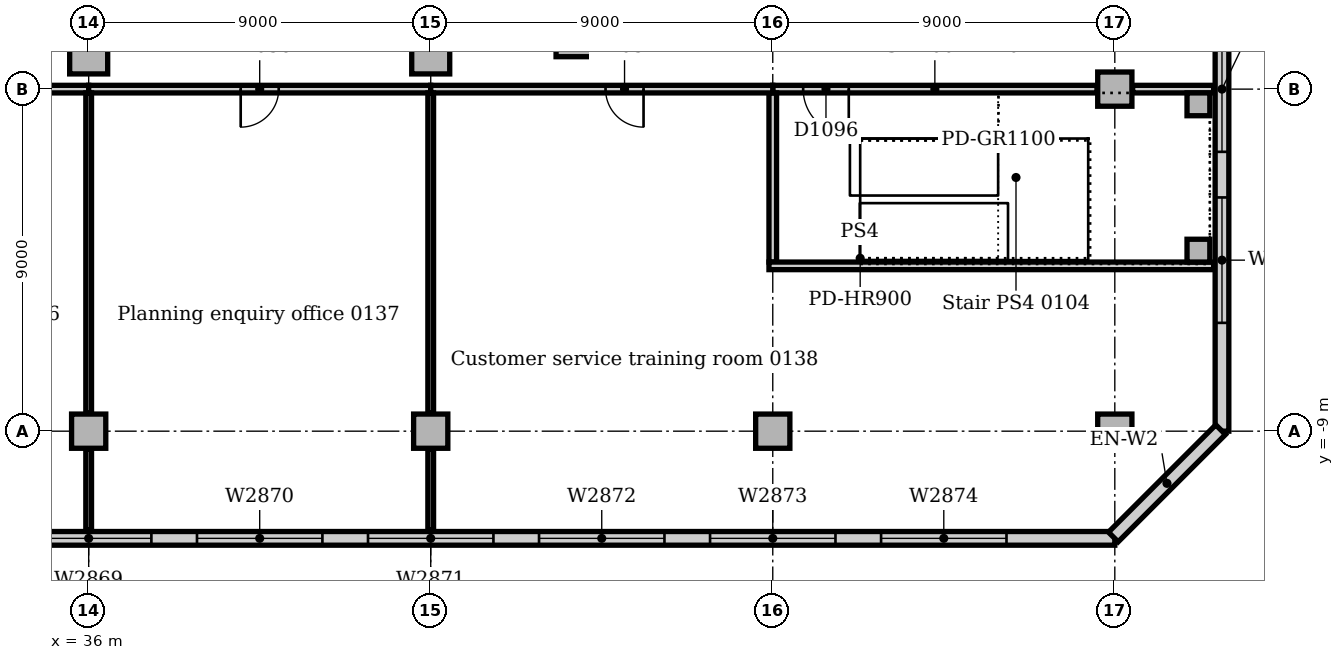
"""IFC4 building model, lengths in metres.
Left out: names, types, materials, properties, quantities, classifications, styles, units other than length and angle.
Written with IfcOpenShell. Run it as: python <this file> out.ifc"""

import sys

from ifc_helpers import new_model, si_unit, direction, frame, frame_2d, origin, origin_2d, place, context, subcontext, project, spatial, rectangle, extrude, element, fill, save


model = new_model("IFC4")
c1 = context("Model", 3, precision=1e-05, world=origin(), true_north=direction((0.0, 1.0)))
c2 = subcontext(c1, "Body", "Model", "MODEL_VIEW")
j1 = project(units=[si_unit("LENGTHUNIT", "METRE"), si_unit("PLANEANGLEUNIT", "RADIAN")], contexts=[c1])
p1 = place(None, origin())
s1 = spatial("IfcSite", under=j1, at=p1, CompositionType="ELEMENT")
p2 = place(p1, origin())
s2 = spatial("IfcBuilding", under=s1, at=p2, CompositionType="ELEMENT")
p3 = place(p2, frame((0.0, 0.0, 6.0)))
s3 = spatial("IfcBuildingStorey", under=s2, at=p3, CompositionType="ELEMENT", Elevation=6.0)
p4 = place(p3, frame((48.898, 1.453, 0.0), z_axis=(0.0, 0.0, 1.0), x_axis=(1.0, 0.0, 0.0)))
e1 = element("IfcColumn", 1, at=p4, inside=s3, PredefinedType="COLUMN", context=c2, shape_type="SweptSolid", body=[
    extrude(rectangle(XDim=1.2, YDim=1.2, at=origin_2d()), origin(), (0.0, 0.0, 1.0), 4.7),
])
for number, where, z_axis, x_axis in (
    (2, (36.0, 0.9, 0.0), (0.0, 0.0, 1.0), (1.0, 0.0, 0.0)),
    (3, (45.0, 0.9, 0.0), (0.0, 0.0, 1.0), (1.0, 0.0, 0.0)),
):
    element("IfcColumn", number, at=place(p3, frame(where, z_axis=z_axis, x_axis=x_axis)), inside=s3, PredefinedType="COLUMN", context=c2, shape_type="SweptSolid", body=[
        extrude(rectangle(XDim=1.0, YDim=1.0, at=origin_2d()), origin(), (0.0, 0.0, 1.0), 4.7),
    ])
for number, where, z_axis, x_axis in (
    (4, (36.0, -9.0, 0.0), (0.0, 0.0, 1.0), (1.0, 0.0, 0.0)),
    (5, (45.0, -9.0, 0.0), (0.0, 0.0, 1.0), (1.0, 0.0, 0.0)),
    (6, (54.0, -9.0, 0.0), (0.0, 0.0, 1.0), (1.0, 0.0, 0.0)),
    (7, (63.0, -9.0, 0.0), (0.0, 0.0, 1.0), (1.0, 0.0, 0.0)),
    (8, (63.0, 0.0, 0.0), (0.0, 0.0, 1.0), (1.0, 0.0, 0.0)),
):
    element("IfcColumn", number, at=place(p3, frame(where, z_axis=z_axis, x_axis=x_axis)), inside=s3, PredefinedType="COLUMN", context=c2, shape_type="SweptSolid", body=[
        extrude(rectangle(XDim=0.9, YDim=0.9, at=origin_2d()), origin(), (0.0, 0.0, 1.0), 4.7),
    ])
p5 = place(p3, frame((0.0, -11.82, 0.0), z_axis=(0.0, 0.0, 1.0), x_axis=(1.0, 0.0, 0.0)))
e9 = element("IfcWall", 9, at=p5, inside=s3, PredefinedType="STANDARD", context=c2, shape_type="SweptSolid", body=[
    extrude(rectangle(XDim=63.0, YDim=0.36, at=frame_2d((31.5, 0.0))), origin(), (0.0, 0.0, 1.0), 4.7),
])
p6 = place(p5, frame((2.85, 0.0, 0.9)))
e10 = element("IfcOpeningElement", 10, at=p6, cuts=e9, PredefinedType="OPENING", context=c2, shape_type="SweptSolid", body=[
    extrude(rectangle(XDim=3.3, YDim=2.4, at=frame_2d((1.65, 1.2))), frame((0.0, 0.19, 0.0), z_axis=(0.0, -1.0, 0.0), x_axis=(1.0, 0.0, 0.0)), (0.0, 0.0, 1.0), 0.38),
])
p7 = place(p5, frame((7.35, 0.0, 0.9)))
e11 = element("IfcOpeningElement", 11, at=p7, cuts=e9, PredefinedType="OPENING", context=c2, shape_type="SweptSolid", body=[
    extrude(rectangle(XDim=3.3, YDim=2.4, at=frame_2d((1.65, 1.2))), frame((0.0, 0.19, 0.0), z_axis=(0.0, -1.0, 0.0), x_axis=(1.0, 0.0, 0.0)), (0.0, 0.0, 1.0), 0.38),
])
p8 = place(p5, frame((11.85, 0.0, 0.9)))
e12 = element("IfcOpeningElement", 12, at=p8, cuts=e9, PredefinedType="OPENING", context=c2, shape_type="SweptSolid", body=[
    extrude(rectangle(XDim=3.3, YDim=2.4, at=frame_2d((1.65, 1.2))), frame((0.0, 0.19, 0.0), z_axis=(0.0, -1.0, 0.0), x_axis=(1.0, 0.0, 0.0)), (0.0, 0.0, 1.0), 0.38),
])
p9 = place(p5, frame((16.35, 0.0, 0.9)))
e13 = element("IfcOpeningElement", 13, at=p9, cuts=e9, PredefinedType="OPENING", context=c2, shape_type="SweptSolid", body=[
    extrude(rectangle(XDim=3.3, YDim=2.4, at=frame_2d((1.65, 1.2))), frame((0.0, 0.19, 0.0), z_axis=(0.0, -1.0, 0.0), x_axis=(1.0, 0.0, 0.0)), (0.0, 0.0, 1.0), 0.38),
])
p10 = place(p5, frame((20.85, 0.0, 0.9)))
e14 = element("IfcOpeningElement", 14, at=p10, cuts=e9, PredefinedType="OPENING", context=c2, shape_type="SweptSolid", body=[
    extrude(rectangle(XDim=3.3, YDim=2.4, at=frame_2d((1.65, 1.2))), frame((0.0, 0.19, 0.0), z_axis=(0.0, -1.0, 0.0), x_axis=(1.0, 0.0, 0.0)), (0.0, 0.0, 1.0), 0.38),
])
p11 = place(p5, frame((25.35, 0.0, 0.9)))
e15 = element("IfcOpeningElement", 15, at=p11, cuts=e9, PredefinedType="OPENING", context=c2, shape_type="SweptSolid", body=[
    extrude(rectangle(XDim=3.3, YDim=2.4, at=frame_2d((1.65, 1.2))), frame((0.0, 0.19, 0.0), z_axis=(0.0, -1.0, 0.0), x_axis=(1.0, 0.0, 0.0)), (0.0, 0.0, 1.0), 0.38),
])
p12 = place(p5, frame((29.85, 0.0, 0.9)))
e16 = element("IfcOpeningElement", 16, at=p12, cuts=e9, PredefinedType="OPENING", context=c2, shape_type="SweptSolid", body=[
    extrude(rectangle(XDim=3.3, YDim=2.4, at=frame_2d((1.65, 1.2))), frame((0.0, 0.19, 0.0), z_axis=(0.0, -1.0, 0.0), x_axis=(1.0, 0.0, 0.0)), (0.0, 0.0, 1.0), 0.38),
])
p13 = place(p5, frame((34.35, 0.0, 0.9)))
e17 = element("IfcOpeningElement", 17, at=p13, cuts=e9, PredefinedType="OPENING", context=c2, shape_type="SweptSolid", body=[
    extrude(rectangle(XDim=3.3, YDim=2.4, at=frame_2d((1.65, 1.2))), frame((0.0, 0.19, 0.0), z_axis=(0.0, -1.0, 0.0), x_axis=(1.0, 0.0, 0.0)), (0.0, 0.0, 1.0), 0.38),
])
p14 = place(p5, frame((38.85, 0.0, 0.9)))
e18 = element("IfcOpeningElement", 18, at=p14, cuts=e9, PredefinedType="OPENING", context=c2, shape_type="SweptSolid", body=[
    extrude(rectangle(XDim=3.3, YDim=2.4, at=frame_2d((1.65, 1.2))), frame((0.0, 0.19, 0.0), z_axis=(0.0, -1.0, 0.0), x_axis=(1.0, 0.0, 0.0)), (0.0, 0.0, 1.0), 0.38),
])
p15 = place(p5, frame((43.35, 0.0, 0.9)))
e19 = element("IfcOpeningElement", 19, at=p15, cuts=e9, PredefinedType="OPENING", context=c2, shape_type="SweptSolid", body=[
    extrude(rectangle(XDim=3.3, YDim=2.4, at=frame_2d((1.65, 1.2))), frame((0.0, 0.19, 0.0), z_axis=(0.0, -1.0, 0.0), x_axis=(1.0, 0.0, 0.0)), (0.0, 0.0, 1.0), 0.38),
])
p16 = place(p5, frame((47.85, 0.0, 0.9)))
e20 = element("IfcOpeningElement", 20, at=p16, cuts=e9, PredefinedType="OPENING", context=c2, shape_type="SweptSolid", body=[
    extrude(rectangle(XDim=3.3, YDim=2.4, at=frame_2d((1.65, 1.2))), frame((0.0, 0.19, 0.0), z_axis=(0.0, -1.0, 0.0), x_axis=(1.0, 0.0, 0.0)), (0.0, 0.0, 1.0), 0.38),
])
p17 = place(p5, frame((52.35, 0.0, 0.9)))
e21 = element("IfcOpeningElement", 21, at=p17, cuts=e9, PredefinedType="OPENING", context=c2, shape_type="SweptSolid", body=[
    extrude(rectangle(XDim=3.3, YDim=2.4, at=frame_2d((1.65, 1.2))), frame((0.0, 0.19, 0.0), z_axis=(0.0, -1.0, 0.0), x_axis=(1.0, 0.0, 0.0)), (0.0, 0.0, 1.0), 0.38),
])
p18 = place(p5, frame((56.85, 0.0, 0.9)))
e22 = element("IfcOpeningElement", 22, at=p18, cuts=e9, PredefinedType="OPENING", context=c2, shape_type="SweptSolid", body=[
    extrude(rectangle(XDim=3.3, YDim=2.4, at=frame_2d((1.65, 1.2))), frame((0.0, 0.19, 0.0), z_axis=(0.0, -1.0, 0.0), x_axis=(1.0, 0.0, 0.0)), (0.0, 0.0, 1.0), 0.38),
])
p19 = place(p3, frame((65.82, -9.0, 0.0), z_axis=(0.0, 0.0, 1.0), x_axis=(0.0, 1.0, 0.0)))
e23 = element("IfcWall", 23, at=p19, inside=s3, PredefinedType="STANDARD", context=c2, shape_type="SweptSolid", body=[
    extrude(rectangle(XDim=63.0, YDim=0.36, at=frame_2d((31.5, 0.0))), origin(), (0.0, 0.0, 1.0), 4.7),
])
p20 = place(p19, frame((2.85, 0.0, 0.9)))
e24 = element("IfcOpeningElement", 24, at=p20, cuts=e23, PredefinedType="OPENING", context=c2, shape_type="SweptSolid", body=[
    extrude(rectangle(XDim=3.3, YDim=2.4, at=frame_2d((1.65, 1.2))), frame((0.0, 0.19, 0.0), z_axis=(0.0, -1.0, 0.0), x_axis=(1.0, 0.0, 0.0)), (0.0, 0.0, 1.0), 0.38),
])
p21 = place(p19, frame((7.35, 0.0, 0.9)))
e25 = element("IfcOpeningElement", 25, at=p21, cuts=e23, PredefinedType="OPENING", context=c2, shape_type="SweptSolid", body=[
    extrude(rectangle(XDim=3.3, YDim=2.4, at=frame_2d((1.65, 1.2))), frame((0.0, 0.19, 0.0), z_axis=(0.0, -1.0, 0.0), x_axis=(1.0, 0.0, 0.0)), (0.0, 0.0, 1.0), 0.38),
])
p22 = place(p19, frame((11.85, 0.0, 0.9)))
e26 = element("IfcOpeningElement", 26, at=p22, cuts=e23, PredefinedType="OPENING", context=c2, shape_type="SweptSolid", body=[
    extrude(rectangle(XDim=3.3, YDim=2.4, at=frame_2d((1.65, 1.2))), frame((0.0, 0.19, 0.0), z_axis=(0.0, -1.0, 0.0), x_axis=(1.0, 0.0, 0.0)), (0.0, 0.0, 1.0), 0.38),
])
p23 = place(p19, frame((16.35, 0.0, 0.9)))
e27 = element("IfcOpeningElement", 27, at=p23, cuts=e23, PredefinedType="OPENING", context=c2, shape_type="SweptSolid", body=[
    extrude(rectangle(XDim=3.3, YDim=2.4, at=frame_2d((1.65, 1.2))), frame((0.0, 0.19, 0.0), z_axis=(0.0, -1.0, 0.0), x_axis=(1.0, 0.0, 0.0)), (0.0, 0.0, 1.0), 0.38),
])
p24 = place(p19, frame((20.85, 0.0, 0.9)))
e28 = element("IfcOpeningElement", 28, at=p24, cuts=e23, PredefinedType="OPENING", context=c2, shape_type="SweptSolid", body=[
    extrude(rectangle(XDim=3.3, YDim=2.4, at=frame_2d((1.65, 1.2))), frame((0.0, 0.19, 0.0), z_axis=(0.0, -1.0, 0.0), x_axis=(1.0, 0.0, 0.0)), (0.0, 0.0, 1.0), 0.38),
])
p25 = place(p19, frame((25.35, 0.0, 0.9)))
e29 = element("IfcOpeningElement", 29, at=p25, cuts=e23, PredefinedType="OPENING", context=c2, shape_type="SweptSolid", body=[
    extrude(rectangle(XDim=3.3, YDim=2.4, at=frame_2d((1.65, 1.2))), frame((0.0, 0.19, 0.0), z_axis=(0.0, -1.0, 0.0), x_axis=(1.0, 0.0, 0.0)), (0.0, 0.0, 1.0), 0.38),
])
p26 = place(p19, frame((29.85, 0.0, 0.9)))
e30 = element("IfcOpeningElement", 30, at=p26, cuts=e23, PredefinedType="OPENING", context=c2, shape_type="SweptSolid", body=[
    extrude(rectangle(XDim=3.3, YDim=2.4, at=frame_2d((1.65, 1.2))), frame((0.0, 0.19, 0.0), z_axis=(0.0, -1.0, 0.0), x_axis=(1.0, 0.0, 0.0)), (0.0, 0.0, 1.0), 0.38),
])
p27 = place(p19, frame((34.35, 0.0, 0.9)))
e31 = element("IfcOpeningElement", 31, at=p27, cuts=e23, PredefinedType="OPENING", context=c2, shape_type="SweptSolid", body=[
    extrude(rectangle(XDim=3.3, YDim=2.4, at=frame_2d((1.65, 1.2))), frame((0.0, 0.19, 0.0), z_axis=(0.0, -1.0, 0.0), x_axis=(1.0, 0.0, 0.0)), (0.0, 0.0, 1.0), 0.38),
])
p28 = place(p19, frame((38.85, 0.0, 0.9)))
e32 = element("IfcOpeningElement", 32, at=p28, cuts=e23, PredefinedType="OPENING", context=c2, shape_type="SweptSolid", body=[
    extrude(rectangle(XDim=3.3, YDim=2.4, at=frame_2d((1.65, 1.2))), frame((0.0, 0.19, 0.0), z_axis=(0.0, -1.0, 0.0), x_axis=(1.0, 0.0, 0.0)), (0.0, 0.0, 1.0), 0.38),
])
p29 = place(p19, frame((43.35, 0.0, 0.9)))
e33 = element("IfcOpeningElement", 33, at=p29, cuts=e23, PredefinedType="OPENING", context=c2, shape_type="SweptSolid", body=[
    extrude(rectangle(XDim=3.3, YDim=2.4, at=frame_2d((1.65, 1.2))), frame((0.0, 0.19, 0.0), z_axis=(0.0, -1.0, 0.0), x_axis=(1.0, 0.0, 0.0)), (0.0, 0.0, 1.0), 0.38),
])
p30 = place(p19, frame((47.85, 0.0, 0.9)))
e34 = element("IfcOpeningElement", 34, at=p30, cuts=e23, PredefinedType="OPENING", context=c2, shape_type="SweptSolid", body=[
    extrude(rectangle(XDim=3.3, YDim=2.4, at=frame_2d((1.65, 1.2))), frame((0.0, 0.19, 0.0), z_axis=(0.0, -1.0, 0.0), x_axis=(1.0, 0.0, 0.0)), (0.0, 0.0, 1.0), 0.38),
])
p31 = place(p19, frame((52.35, 0.0, 0.9)))
e35 = element("IfcOpeningElement", 35, at=p31, cuts=e23, PredefinedType="OPENING", context=c2, shape_type="SweptSolid", body=[
    extrude(rectangle(XDim=3.3, YDim=2.4, at=frame_2d((1.65, 1.2))), frame((0.0, 0.19, 0.0), z_axis=(0.0, -1.0, 0.0), x_axis=(1.0, 0.0, 0.0)), (0.0, 0.0, 1.0), 0.38),
])
p32 = place(p19, frame((56.85, 0.0, 0.9)))
e36 = element("IfcOpeningElement", 36, at=p32, cuts=e23, PredefinedType="OPENING", context=c2, shape_type="SweptSolid", body=[
    extrude(rectangle(XDim=3.3, YDim=2.4, at=frame_2d((1.65, 1.2))), frame((0.0, 0.19, 0.0), z_axis=(0.0, -1.0, 0.0), x_axis=(1.0, 0.0, 0.0)), (0.0, 0.0, 1.0), 0.38),
])
p33 = place(p3, frame((62.961, -11.784, 0.0), z_axis=(0.0, 0.0, 1.0), x_axis=(0.707106781187, 0.707106781187, 0.0)))
e37 = element("IfcWall", 37, at=p33, inside=s3, PredefinedType="STANDARD", context=c2, shape_type="SweptSolid", body=[
    extrude(rectangle(XDim=3.993, YDim=0.36, at=frame_2d((1.996, 0.0))), origin(), (0.0, 0.0, 1.0), 4.7),
])
for number, where, z_axis, x_axis in (
    (38, (65.2, -4.25, 0.0), (0.0, 0.0, 1.0), (1.0, 0.0, 0.0)),
    (39, (65.2, -0.4, 0.0), (0.0, 0.0, 1.0), (1.0, 0.0, 0.0)),
):
    element("IfcColumn", number, at=place(p3, frame(where, z_axis=z_axis, x_axis=x_axis)), inside=s3, PredefinedType="COLUMN", context=c2, shape_type="SweptSolid", body=[
        extrude(rectangle(XDim=0.6, YDim=0.6, at=origin_2d()), origin(), (0.0, 0.0, 1.0), 5.0),
    ])
p34 = place(p3, frame((54.0, 0.0, 0.0), z_axis=(0.0, 0.0, 1.0), x_axis=(1.0, 0.0, 0.0)))
e40 = element("IfcWall", 40, at=p34, inside=s3, PredefinedType="SOLIDWALL", context=c2, shape_type="SweptSolid", body=[
    extrude(rectangle(XDim=8.53, YDim=0.2, at=frame_2d((4.265, 0.0))), origin(), (0.0, 0.0, 1.0), 4.7),
])
p35 = place(p34, frame((0.8, 0.0, 0.0)))
e41 = element("IfcOpeningElement", 41, at=p35, cuts=e40, PredefinedType="OPENING", context=c2, shape_type="SweptSolid", body=[
    extrude(rectangle(XDim=1.2, YDim=2.1, at=frame_2d((0.6, 1.05))), frame((0.0, 0.11, 0.0), z_axis=(0.0, -1.0, 0.0), x_axis=(1.0, 0.0, 0.0)), (0.0, 0.0, 1.0), 0.22),
])
p36 = place(p3, frame((63.47, 0.0, 0.0), z_axis=(0.0, 0.0, 1.0), x_axis=(1.0, 0.0, 0.0)))
e42 = element("IfcWall", 42, at=p36, inside=s3, PredefinedType="SOLIDWALL", context=c2, shape_type="SweptSolid", body=[
    extrude(rectangle(XDim=2.13, YDim=0.2, at=frame_2d((1.065, 0.0))), origin(), (0.0, 0.0, 1.0), 4.7),
])
p37 = place(p3, frame((54.0, -4.55, 0.0), z_axis=(0.0, 0.0, 1.0), x_axis=(0.0, 1.0, 0.0)))
e43 = element("IfcWall", 43, at=p37, inside=s3, PredefinedType="SOLIDWALL", context=c2, shape_type="SweptSolid", body=[
    extrude(rectangle(XDim=4.45, YDim=0.2, at=frame_2d((2.225, 0.0))), origin(), (0.0, 0.0, 1.0), 4.7),
])
p38 = place(p3, frame((53.9, -4.65, 0.0), z_axis=(0.0, 0.0, 1.0), x_axis=(1.0, 0.0, 0.0)))
e44 = element("IfcWall", 44, at=p38, inside=s3, PredefinedType="SOLIDWALL", context=c2, shape_type="SweptSolid", body=[
    extrude(rectangle(XDim=11.7, YDim=0.2, at=frame_2d((5.85, 0.0))), origin(), (0.0, 0.0, 1.0), 4.7),
])
p39 = place(p3, frame((27.0, 0.0, 0.0), z_axis=(0.0, 0.0, 1.0), x_axis=(1.0, 0.0, 0.0)))
e45 = element("IfcWall", 45, at=p39, inside=s3, PredefinedType="PARTITIONING", context=c2, shape_type="SweptSolid", body=[
    extrude(rectangle(XDim=9.0, YDim=0.2, at=frame_2d((4.5, 0.0))), origin(), (0.0, 0.0, 1.0), 4.7),
])
p40 = place(p39, frame((4.0, 0.0, 0.0)))
e46 = element("IfcOpeningElement", 46, at=p40, cuts=e45, PredefinedType="OPENING", context=c2, shape_type="SweptSolid", body=[
    extrude(rectangle(XDim=1.0, YDim=2.1, at=frame_2d((0.5, 1.05))), frame((0.0, 0.11, 0.0), z_axis=(0.0, -1.0, 0.0), x_axis=(1.0, 0.0, 0.0)), (0.0, 0.0, 1.0), 0.22),
])
p41 = place(p3, frame((36.0, 0.0, 0.0), z_axis=(0.0, 0.0, 1.0), x_axis=(1.0, 0.0, 0.0)))
e47 = element("IfcWall", 47, at=p41, inside=s3, PredefinedType="PARTITIONING", context=c2, shape_type="SweptSolid", body=[
    extrude(rectangle(XDim=9.0, YDim=0.2, at=frame_2d((4.5, 0.0))), origin(), (0.0, 0.0, 1.0), 4.7),
])
p42 = place(p41, frame((4.0, 0.0, 0.0)))
e48 = element("IfcOpeningElement", 48, at=p42, cuts=e47, PredefinedType="OPENING", context=c2, shape_type="SweptSolid", body=[
    extrude(rectangle(XDim=1.0, YDim=2.1, at=frame_2d((0.5, 1.05))), frame((0.0, 0.11, 0.0), z_axis=(0.0, -1.0, 0.0), x_axis=(1.0, 0.0, 0.0)), (0.0, 0.0, 1.0), 0.22),
])
p43 = place(p3, frame((45.0, 0.0, 0.0), z_axis=(0.0, 0.0, 1.0), x_axis=(1.0, 0.0, 0.0)))
e49 = element("IfcWall", 49, at=p43, inside=s3, PredefinedType="PARTITIONING", context=c2, shape_type="SweptSolid", body=[
    extrude(rectangle(XDim=9.0, YDim=0.2, at=frame_2d((4.5, 0.0))), origin(), (0.0, 0.0, 1.0), 4.7),
])
p44 = place(p43, frame((4.6, 0.0, 0.0)))
e50 = element("IfcOpeningElement", 50, at=p44, cuts=e49, PredefinedType="OPENING", context=c2, shape_type="SweptSolid", body=[
    extrude(rectangle(XDim=1.0, YDim=2.1, at=frame_2d((0.5, 1.05))), frame((0.0, 0.11, 0.0), z_axis=(0.0, -1.0, 0.0), x_axis=(1.0, 0.0, 0.0)), (0.0, 0.0, 1.0), 0.22),
])
p45 = place(p3, frame((36.0, -11.6, 0.0), z_axis=(0.0, 0.0, 1.0), x_axis=(0.0, 1.0, 0.0)))
e51 = element("IfcWall", 51, at=p45, inside=s3, PredefinedType="PARTITIONING", context=c2, shape_type="SweptSolid", body=[
    extrude(rectangle(XDim=2.13, YDim=0.15, at=frame_2d((1.065, 0.0))), origin(), (0.0, 0.0, 1.0), 4.7),
])
p46 = place(p3, frame((36.0, -8.53, 0.0), z_axis=(0.0, 0.0, 1.0), x_axis=(0.0, 1.0, 0.0)))
e52 = element("IfcWall", 52, at=p46, inside=s3, PredefinedType="PARTITIONING", context=c2, shape_type="SweptSolid", body=[
    extrude(rectangle(XDim=8.43, YDim=0.15, at=frame_2d((4.215, 0.0))), origin(), (0.0, 0.0, 1.0), 4.7),
])
p47 = place(p3, frame((45.0, -11.6, 0.0), z_axis=(0.0, 0.0, 1.0), x_axis=(0.0, 1.0, 0.0)))
e53 = element("IfcWall", 53, at=p47, inside=s3, PredefinedType="PARTITIONING", context=c2, shape_type="SweptSolid", body=[
    extrude(rectangle(XDim=2.13, YDim=0.15, at=frame_2d((1.065, 0.0))), origin(), (0.0, 0.0, 1.0), 4.7),
])
p48 = place(p3, frame((45.0, -8.53, 0.0), z_axis=(0.0, 0.0, 1.0), x_axis=(0.0, 1.0, 0.0)))
e54 = element("IfcWall", 54, at=p48, inside=s3, PredefinedType="PARTITIONING", context=c2, shape_type="SweptSolid", body=[
    extrude(rectangle(XDim=8.43, YDim=0.15, at=frame_2d((4.215, 0.0))), origin(), (0.0, 0.0, 1.0), 4.7),
])
p49 = place(p13, origin())
e55 = element("IfcWindow", 55, at=p49, inside=s3, PartitioningType="SINGLE_PANEL", PredefinedType="WINDOW", context=c2, shape_type="SweptSolid", body=[
    extrude(rectangle(XDim=3.3, YDim=2.4, at=frame_2d((1.65, 1.2))), frame((0.0, 0.13, 0.0), z_axis=(0.0, -1.0, 0.0), x_axis=(1.0, 0.0, 0.0)), (0.0, 0.0, 1.0), 0.06),
])
fill(e17, e55)
p50 = place(p14, origin())
e56 = element("IfcWindow", 56, at=p50, inside=s3, PartitioningType="SINGLE_PANEL", PredefinedType="WINDOW", context=c2, shape_type="SweptSolid", body=[
    extrude(rectangle(XDim=3.3, YDim=2.4, at=frame_2d((1.65, 1.2))), frame((0.0, 0.13, 0.0), z_axis=(0.0, -1.0, 0.0), x_axis=(1.0, 0.0, 0.0)), (0.0, 0.0, 1.0), 0.06),
])
fill(e18, e56)
p51 = place(p15, origin())
e57 = element("IfcWindow", 57, at=p51, inside=s3, PartitioningType="SINGLE_PANEL", PredefinedType="WINDOW", context=c2, shape_type="SweptSolid", body=[
    extrude(rectangle(XDim=3.3, YDim=2.4, at=frame_2d((1.65, 1.2))), frame((0.0, 0.13, 0.0), z_axis=(0.0, -1.0, 0.0), x_axis=(1.0, 0.0, 0.0)), (0.0, 0.0, 1.0), 0.06),
])
fill(e19, e57)
p52 = place(p16, origin())
e58 = element("IfcWindow", 58, at=p52, inside=s3, PartitioningType="SINGLE_PANEL", PredefinedType="WINDOW", context=c2, shape_type="SweptSolid", body=[
    extrude(rectangle(XDim=3.3, YDim=2.4, at=frame_2d((1.65, 1.2))), frame((0.0, 0.13, 0.0), z_axis=(0.0, -1.0, 0.0), x_axis=(1.0, 0.0, 0.0)), (0.0, 0.0, 1.0), 0.06),
])
fill(e20, e58)
p53 = place(p17, origin())
e59 = element("IfcWindow", 59, at=p53, inside=s3, PartitioningType="SINGLE_PANEL", PredefinedType="WINDOW", context=c2, shape_type="SweptSolid", body=[
    extrude(rectangle(XDim=3.3, YDim=2.4, at=frame_2d((1.65, 1.2))), frame((0.0, 0.13, 0.0), z_axis=(0.0, -1.0, 0.0), x_axis=(1.0, 0.0, 0.0)), (0.0, 0.0, 1.0), 0.06),
])
fill(e21, e59)
p54 = place(p18, origin())
e60 = element("IfcWindow", 60, at=p54, inside=s3, PartitioningType="SINGLE_PANEL", PredefinedType="WINDOW", context=c2, shape_type="SweptSolid", body=[
    extrude(rectangle(XDim=3.3, YDim=2.4, at=frame_2d((1.65, 1.2))), frame((0.0, 0.13, 0.0), z_axis=(0.0, -1.0, 0.0), x_axis=(1.0, 0.0, 0.0)), (0.0, 0.0, 1.0), 0.06),
])
fill(e22, e60)
p55 = place(p20, origin())
e61 = element("IfcWindow", 61, at=p55, inside=s3, PartitioningType="SINGLE_PANEL", PredefinedType="WINDOW", context=c2, shape_type="SweptSolid", body=[
    extrude(rectangle(XDim=3.3, YDim=2.4, at=frame_2d((1.65, 1.2))), frame((0.0, 0.13, 0.0), z_axis=(0.0, -1.0, 0.0), x_axis=(1.0, 0.0, 0.0)), (0.0, 0.0, 1.0), 0.06),
])
fill(e24, e61)
p56 = place(p21, origin())
e62 = element("IfcWindow", 62, at=p56, inside=s3, PartitioningType="SINGLE_PANEL", PredefinedType="WINDOW", context=c2, shape_type="SweptSolid", body=[
    extrude(rectangle(XDim=3.3, YDim=2.4, at=frame_2d((1.65, 1.2))), frame((0.0, 0.13, 0.0), z_axis=(0.0, -1.0, 0.0), x_axis=(1.0, 0.0, 0.0)), (0.0, 0.0, 1.0), 0.06),
])
fill(e25, e62)
p57 = place(p42, frame((1.0, 0.0, 0.0), z_axis=(0.0, 0.0, 1.0), x_axis=(-1.0, 0.0, 0.0)))
e63 = element("IfcDoor", 63, at=p57, inside=s3, OperationType="SINGLE_SWING_RIGHT", PredefinedType="DOOR", context=c2, shape_type="SweptSolid", body=[
    extrude(rectangle(XDim=1.0, YDim=2.1, at=frame_2d((0.5, 1.05))), frame((0.0, 0.025, 0.0), z_axis=(0.0, -1.0, 0.0), x_axis=(1.0, 0.0, 0.0)), (0.0, 0.0, 1.0), 0.05),
])
fill(e48, e63)
p58 = place(p44, frame((1.0, 0.0, 0.0), z_axis=(0.0, 0.0, 1.0), x_axis=(-1.0, 0.0, 0.0)))
e64 = element("IfcDoor", 64, at=p58, inside=s3, OperationType="SINGLE_SWING_LEFT", PredefinedType="DOOR", context=c2, shape_type="SweptSolid", body=[
    extrude(rectangle(XDim=1.0, YDim=2.1, at=frame_2d((0.5, 1.05))), frame((0.0, 0.025, 0.0), z_axis=(0.0, -1.0, 0.0), x_axis=(1.0, 0.0, 0.0)), (0.0, 0.0, 1.0), 0.05),
])
fill(e50, e64)
p59 = place(p35, frame((1.2, 0.0, 0.0), z_axis=(0.0, 0.0, 1.0), x_axis=(-1.0, 0.0, 0.0)))
e65 = element("IfcDoor", 65, at=p59, inside=s3, OperationType="SINGLE_SWING_LEFT", PredefinedType="DOOR", context=c2, shape_type="SweptSolid", body=[
    extrude(rectangle(XDim=1.2, YDim=2.1, at=frame_2d((0.6, 1.05))), frame((0.0, 0.025, 0.0), z_axis=(0.0, -1.0, 0.0), x_axis=(1.0, 0.0, 0.0)), (0.0, 0.0, 1.0), 0.05),
])
fill(e41, e65)
save(model, sys.argv[1])
